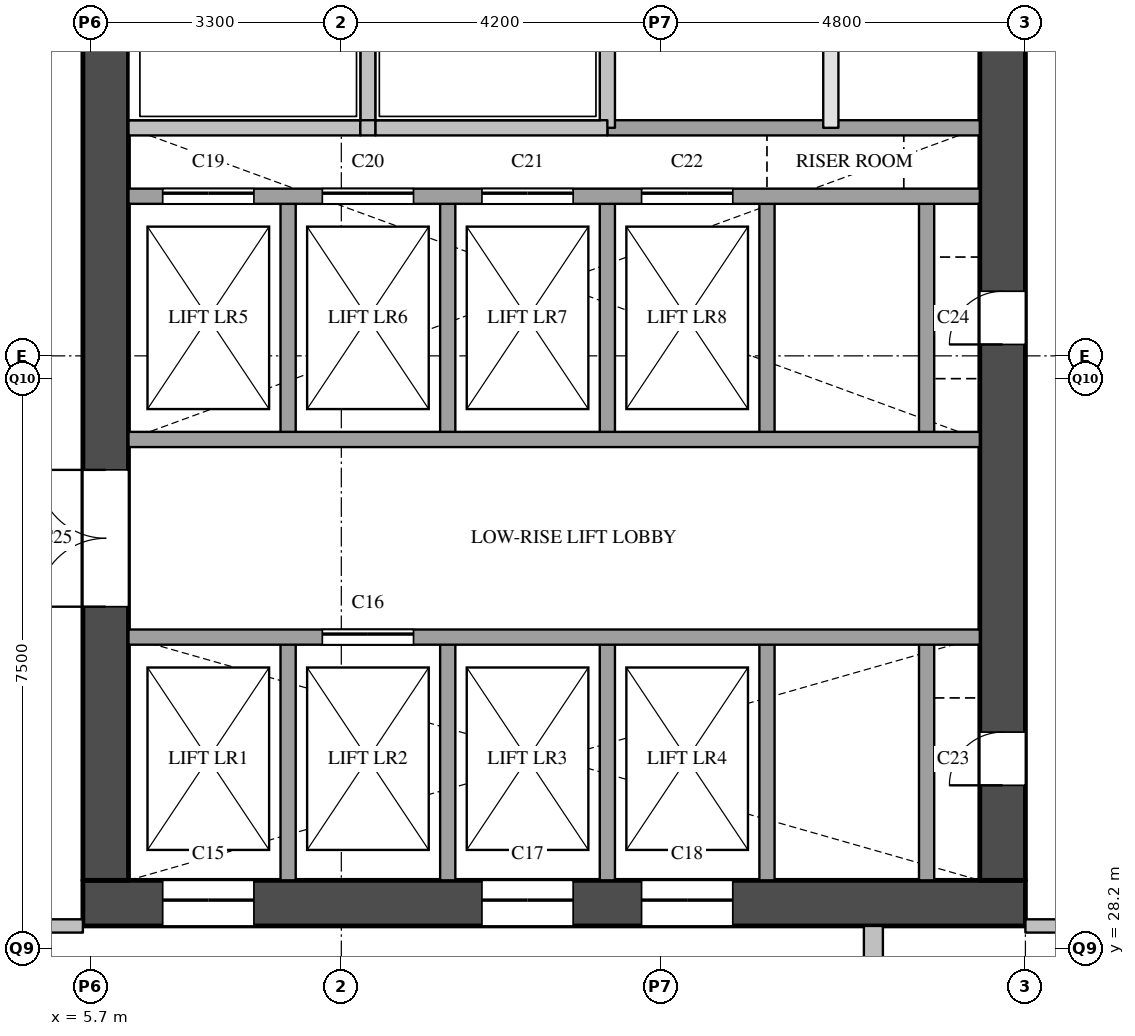
"""IFC4 building model, lengths in metres.
Left out: names, types, materials, properties, quantities, classifications, styles, units other than length and angle.
Written with IfcOpenShell. Run it as: python <this file> out.ifc"""

import sys

from ifc_helpers import new_model, si_unit, direction, frame, frame_2d, origin, place, context, subcontext, project, spatial, rectangle, extrude, element, fill, save


model = new_model("IFC4")
c1 = context("Model", 3, precision=1e-05, world=origin(), true_north=direction((0.0, 1.0)))
c2 = subcontext(c1, "Body", "Model", "MODEL_VIEW")
j1 = project(units=[si_unit("LENGTHUNIT", "METRE"), si_unit("PLANEANGLEUNIT", "RADIAN")], contexts=[c1])
p1 = place(None, origin())
s1 = spatial("IfcSite", under=j1, at=p1, CompositionType="ELEMENT")
p2 = place(p1, origin())
s2 = spatial("IfcBuilding", under=s1, at=p2, CompositionType="ELEMENT")
p3 = place(p2, frame((0.0, 0.0, 81.6)))
s3 = spatial("IfcBuildingStorey", under=s2, at=p3, CompositionType="ELEMENT", Elevation=81.6)
p4 = place(p3, frame((5.6, 28.8, 0.0), z_axis=(0.0, 0.0, 1.0), x_axis=(1.0, 0.0, 0.0)))
e1 = element("IfcWall", 1, at=p4, inside=s3, PredefinedType="SHEAR", context=c2, shape_type="SweptSolid", body=[
    extrude(rectangle(XDim=12.4, YDim=0.6, at=frame_2d((6.2, 0.0))), origin(), (0.0, 0.0, 1.0), 3.5),
])
p5 = place(p4, frame((1.05, 0.0, 0.0)))
e2 = element("IfcOpeningElement", 2, at=p5, cuts=e1, PredefinedType="OPENING", context=c2, shape_type="SweptSolid", body=[
    extrude(rectangle(XDim=1.2, YDim=2.1, at=frame_2d((0.6, 1.05))), frame((0.0, 0.31, 0.0), z_axis=(0.0, -1.0, 0.0), x_axis=(1.0, 0.0, 0.0)), (0.0, 0.0, 1.0), 0.62),
])
p6 = place(p4, frame((5.25, 0.0, 0.0)))
e3 = element("IfcOpeningElement", 3, at=p6, cuts=e1, PredefinedType="OPENING", context=c2, shape_type="SweptSolid", body=[
    extrude(rectangle(XDim=1.2, YDim=2.1, at=frame_2d((0.6, 1.05))), frame((0.0, 0.31, 0.0), z_axis=(0.0, -1.0, 0.0), x_axis=(1.0, 0.0, 0.0)), (0.0, 0.0, 1.0), 0.62),
])
p7 = place(p4, frame((7.35, 0.0, 0.0)))
e4 = element("IfcOpeningElement", 4, at=p7, cuts=e1, PredefinedType="OPENING", context=c2, shape_type="SweptSolid", body=[
    extrude(rectangle(XDim=1.2, YDim=2.1, at=frame_2d((0.6, 1.05))), frame((0.0, 0.31, 0.0), z_axis=(0.0, -1.0, 0.0), x_axis=(1.0, 0.0, 0.0)), (0.0, 0.0, 1.0), 0.62),
])
p8 = place(p3, frame((5.9, 29.1, 0.0), z_axis=(0.0, 0.0, 1.0), x_axis=(0.0, 1.0, 0.0)))
e5 = element("IfcWall", 5, at=p8, inside=s3, PredefinedType="SHEAR", context=c2, shape_type="SweptSolid", body=[
    extrude(rectangle(XDim=20.3, YDim=0.6, at=frame_2d((10.15, 0.0))), origin(), (0.0, 0.0, 1.0), 3.5),
])
p9 = place(p8, frame((3.6, 0.0, 0.0)))
e6 = element("IfcOpeningElement", 6, at=p9, cuts=e5, PredefinedType="OPENING", context=c2, shape_type="SweptSolid", body=[
    extrude(rectangle(XDim=1.8, YDim=2.1, at=frame_2d((0.9, 1.05))), frame((0.0, 0.31, 0.0), z_axis=(0.0, -1.0, 0.0), x_axis=(1.0, 0.0, 0.0)), (0.0, 0.0, 1.0), 0.62),
])
p10 = place(p8, frame((16.4, 0.0, 0.0)))
e7 = element("IfcOpeningElement", 7, at=p10, cuts=e5, PredefinedType="OPENING", context=c2, shape_type="SweptSolid", body=[
    extrude(rectangle(XDim=1.0, YDim=2.1, at=frame_2d((0.5, 1.05))), frame((0.0, 0.31, 0.0), z_axis=(0.0, -1.0, 0.0), x_axis=(1.0, 0.0, 0.0)), (0.0, 0.0, 1.0), 0.62),
])
p11 = place(p3, frame((17.7, 29.1, 0.0), z_axis=(0.0, 0.0, 1.0), x_axis=(0.0, 1.0, 0.0)))
e8 = element("IfcWall", 8, at=p11, inside=s3, PredefinedType="SHEAR", context=c2, shape_type="SweptSolid", body=[
    extrude(rectangle(XDim=20.3, YDim=0.6, at=frame_2d((10.15, 0.0))), origin(), (0.0, 0.0, 1.0), 3.5),
])
p12 = place(p11, frame((1.25, 0.0, 0.0)))
e9 = element("IfcOpeningElement", 9, at=p12, cuts=e8, PredefinedType="OPENING", context=c2, shape_type="SweptSolid", body=[
    extrude(rectangle(XDim=0.7, YDim=2.1, at=frame_2d((0.35, 1.05))), frame((0.0, 0.31, 0.0), z_axis=(0.0, -1.0, 0.0), x_axis=(1.0, 0.0, 0.0)), (0.0, 0.0, 1.0), 0.62),
])
p13 = place(p11, frame((7.05, 0.0, 0.0)))
e10 = element("IfcOpeningElement", 10, at=p13, cuts=e8, PredefinedType="OPENING", context=c2, shape_type="SweptSolid", body=[
    extrude(rectangle(XDim=0.7, YDim=2.1, at=frame_2d((0.35, 1.05))), frame((0.0, 0.31, 0.0), z_axis=(0.0, -1.0, 0.0), x_axis=(1.0, 0.0, 0.0)), (0.0, 0.0, 1.0), 0.62),
])
p14 = place(p3, frame((8.3, 29.1, 0.0), z_axis=(0.0, 0.0, 1.0), x_axis=(0.0, 1.0, 0.0)))
e11 = element("IfcWall", 11, at=p14, inside=s3, PredefinedType="SOLIDWALL", context=c2, shape_type="SweptSolid", body=[
    extrude(rectangle(XDim=3.2, YDim=0.2, at=frame_2d((1.6, 0.0))), origin(), (0.0, 0.0, 1.0), 3.5),
])
p15 = place(p3, frame((8.3, 34.9, 0.0), z_axis=(0.0, 0.0, 1.0), x_axis=(0.0, 1.0, 0.0)))
e12 = element("IfcWall", 12, at=p15, inside=s3, PredefinedType="SOLIDWALL", context=c2, shape_type="SweptSolid", body=[
    extrude(rectangle(XDim=3.2, YDim=0.2, at=frame_2d((1.6, 0.0))), origin(), (0.0, 0.0, 1.0), 3.5),
])
p16 = place(p3, frame((9.35, 39.0, 0.0), z_axis=(0.0, 0.0, 1.0), x_axis=(0.0, 1.0, 0.0)))
e13 = element("IfcWall", 13, at=p16, inside=s3, PredefinedType="SOLIDWALL", context=c2, shape_type="SweptSolid", body=[
    extrude(rectangle(XDim=1.9, YDim=0.2, at=frame_2d((0.95, 0.0))), origin(), (0.0, 0.0, 1.0), 3.5),
])
p17 = place(p3, frame((10.4, 29.1, 0.0), z_axis=(0.0, 0.0, 1.0), x_axis=(0.0, 1.0, 0.0)))
e14 = element("IfcWall", 14, at=p17, inside=s3, PredefinedType="SOLIDWALL", context=c2, shape_type="SweptSolid", body=[
    extrude(rectangle(XDim=3.2, YDim=0.2, at=frame_2d((1.6, 0.0))), origin(), (0.0, 0.0, 1.0), 3.5),
])
p18 = place(p3, frame((10.4, 34.9, 0.0), z_axis=(0.0, 0.0, 1.0), x_axis=(0.0, 1.0, 0.0)))
e15 = element("IfcWall", 15, at=p18, inside=s3, PredefinedType="SOLIDWALL", context=c2, shape_type="SweptSolid", body=[
    extrude(rectangle(XDim=3.2, YDim=0.2, at=frame_2d((1.6, 0.0))), origin(), (0.0, 0.0, 1.0), 3.5),
])
p19 = place(p3, frame((12.5, 29.1, 0.0), z_axis=(0.0, 0.0, 1.0), x_axis=(0.0, 1.0, 0.0)))
e16 = element("IfcWall", 16, at=p19, inside=s3, PredefinedType="SOLIDWALL", context=c2, shape_type="SweptSolid", body=[
    extrude(rectangle(XDim=3.2, YDim=0.2, at=frame_2d((1.6, 0.0))), origin(), (0.0, 0.0, 1.0), 3.5),
])
p20 = place(p3, frame((12.5, 34.9, 0.0), z_axis=(0.0, 0.0, 1.0), x_axis=(0.0, 1.0, 0.0)))
e17 = element("IfcWall", 17, at=p20, inside=s3, PredefinedType="SOLIDWALL", context=c2, shape_type="SweptSolid", body=[
    extrude(rectangle(XDim=3.2, YDim=0.2, at=frame_2d((1.6, 0.0))), origin(), (0.0, 0.0, 1.0), 3.5),
])
p21 = place(p3, frame((12.5, 39.0, 0.0), z_axis=(0.0, 0.0, 1.0), x_axis=(0.0, 1.0, 0.0)))
e18 = element("IfcWall", 18, at=p21, inside=s3, PredefinedType="SOLIDWALL", context=c2, shape_type="SweptSolid", body=[
    extrude(rectangle(XDim=1.9, YDim=0.2, at=frame_2d((0.95, 0.0))), origin(), (0.0, 0.0, 1.0), 3.5),
])
p22 = place(p3, frame((14.6, 29.1, 0.0), z_axis=(0.0, 0.0, 1.0), x_axis=(0.0, 1.0, 0.0)))
e19 = element("IfcWall", 19, at=p22, inside=s3, PredefinedType="SOLIDWALL", context=c2, shape_type="SweptSolid", body=[
    extrude(rectangle(XDim=3.2, YDim=0.2, at=frame_2d((1.6, 0.0))), origin(), (0.0, 0.0, 1.0), 3.5),
])
p23 = place(p3, frame((14.6, 34.9, 0.0), z_axis=(0.0, 0.0, 1.0), x_axis=(0.0, 1.0, 0.0)))
e20 = element("IfcWall", 20, at=p23, inside=s3, PredefinedType="SOLIDWALL", context=c2, shape_type="SweptSolid", body=[
    extrude(rectangle(XDim=3.2, YDim=0.2, at=frame_2d((1.6, 0.0))), origin(), (0.0, 0.0, 1.0), 3.5),
])
p24 = place(p3, frame((15.44, 39.0, 0.0), z_axis=(0.0, 0.0, 1.0), x_axis=(0.0, 1.0, 0.0)))
e21 = element("IfcWall", 21, at=p24, inside=s3, PredefinedType="PARTITIONING", context=c2, shape_type="SweptSolid", body=[
    extrude(rectangle(XDim=6.2, YDim=0.2, at=frame_2d((3.1, 0.0))), origin(), (0.0, 0.0, 1.0), 3.5),
])
p25 = place(p3, frame((16.7, 29.1, 0.0), z_axis=(0.0, 0.0, 1.0), x_axis=(0.0, 1.0, 0.0)))
e22 = element("IfcWall", 22, at=p25, inside=s3, PredefinedType="SOLIDWALL", context=c2, shape_type="SweptSolid", body=[
    extrude(rectangle(XDim=3.2, YDim=0.2, at=frame_2d((1.6, 0.0))), origin(), (0.0, 0.0, 1.0), 3.5),
])
p26 = place(p3, frame((16.7, 34.9, 0.0), z_axis=(0.0, 0.0, 1.0), x_axis=(0.0, 1.0, 0.0)))
e23 = element("IfcWall", 23, at=p26, inside=s3, PredefinedType="SOLIDWALL", context=c2, shape_type="SweptSolid", body=[
    extrude(rectangle(XDim=3.2, YDim=0.2, at=frame_2d((1.6, 0.0))), origin(), (0.0, 0.0, 1.0), 3.5),
])
p27 = place(p3, frame((6.2, 32.3, 0.0), z_axis=(0.0, 0.0, 1.0), x_axis=(1.0, 0.0, 0.0)))
e24 = element("IfcWall", 24, at=p27, inside=s3, PredefinedType="SOLIDWALL", context=c2, shape_type="SweptSolid", body=[
    extrude(rectangle(XDim=11.2, YDim=0.2, at=frame_2d((5.6, 0.0))), origin(), (0.0, 0.0, 1.0), 3.5),
])
p28 = place(p27, frame((2.55, 0.0, 0.0)))
e25 = element("IfcOpeningElement", 25, at=p28, cuts=e24, PredefinedType="OPENING", context=c2, shape_type="SweptSolid", body=[
    extrude(rectangle(XDim=1.2, YDim=2.1, at=frame_2d((0.6, 1.05))), frame((0.0, 0.11, 0.0), z_axis=(0.0, -1.0, 0.0), x_axis=(1.0, 0.0, 0.0)), (0.0, 0.0, 1.0), 0.22),
])
p29 = place(p3, frame((6.2, 34.9, 0.0), z_axis=(0.0, 0.0, 1.0), x_axis=(1.0, 0.0, 0.0)))
e26 = element("IfcWall", 26, at=p29, inside=s3, PredefinedType="SOLIDWALL", context=c2, shape_type="SweptSolid", body=[
    extrude(rectangle(XDim=11.2, YDim=0.2, at=frame_2d((5.6, 0.0))), origin(), (0.0, 0.0, 1.0), 3.5),
])
p30 = place(p3, frame((6.2, 38.1, 0.0), z_axis=(0.0, 0.0, 1.0), x_axis=(1.0, 0.0, 0.0)))
e27 = element("IfcWall", 27, at=p30, inside=s3, PredefinedType="SOLIDWALL", context=c2, shape_type="SweptSolid", body=[
    extrude(rectangle(XDim=11.2, YDim=0.2, at=frame_2d((5.6, 0.0))), origin(), (0.0, 0.0, 1.0), 3.5),
])
p31 = place(p30, frame((0.45, 0.0, 0.0)))
e28 = element("IfcOpeningElement", 28, at=p31, cuts=e27, PredefinedType="OPENING", context=c2, shape_type="SweptSolid", body=[
    extrude(rectangle(XDim=1.2, YDim=2.1, at=frame_2d((0.6, 1.05))), frame((0.0, 0.11, 0.0), z_axis=(0.0, -1.0, 0.0), x_axis=(1.0, 0.0, 0.0)), (0.0, 0.0, 1.0), 0.22),
])
p32 = place(p30, frame((2.55, 0.0, 0.0)))
e29 = element("IfcOpeningElement", 29, at=p32, cuts=e27, PredefinedType="OPENING", context=c2, shape_type="SweptSolid", body=[
    extrude(rectangle(XDim=1.2, YDim=2.1, at=frame_2d((0.6, 1.05))), frame((0.0, 0.11, 0.0), z_axis=(0.0, -1.0, 0.0), x_axis=(1.0, 0.0, 0.0)), (0.0, 0.0, 1.0), 0.22),
])
p33 = place(p30, frame((4.65, 0.0, 0.0)))
e30 = element("IfcOpeningElement", 30, at=p33, cuts=e27, PredefinedType="OPENING", context=c2, shape_type="SweptSolid", body=[
    extrude(rectangle(XDim=1.2, YDim=2.1, at=frame_2d((0.6, 1.05))), frame((0.0, 0.11, 0.0), z_axis=(0.0, -1.0, 0.0), x_axis=(1.0, 0.0, 0.0)), (0.0, 0.0, 1.0), 0.22),
])
p34 = place(p30, frame((6.75, 0.0, 0.0)))
e31 = element("IfcOpeningElement", 31, at=p34, cuts=e27, PredefinedType="OPENING", context=c2, shape_type="SweptSolid", body=[
    extrude(rectangle(XDim=1.2, YDim=2.1, at=frame_2d((0.6, 1.05))), frame((0.0, 0.11, 0.0), z_axis=(0.0, -1.0, 0.0), x_axis=(1.0, 0.0, 0.0)), (0.0, 0.0, 1.0), 0.22),
])
p35 = place(p3, frame((12.5, 39.0, 0.0), z_axis=(0.0, 0.0, 1.0), x_axis=(1.0, 0.0, 0.0)))
e32 = element("IfcWall", 32, at=p35, inside=s3, PredefinedType="SOLIDWALL", context=c2, shape_type="SweptSolid", body=[
    extrude(rectangle(XDim=4.9, YDim=0.2, at=frame_2d((2.45, 0.0))), origin(), (0.0, 0.0, 1.0), 3.5),
])
p36 = place(p3, frame((6.2, 39.0, 0.0), z_axis=(0.0, 0.0, 1.0), x_axis=(1.0, 0.0, 0.0)))
e33 = element("IfcWall", 33, at=p36, inside=s3, PredefinedType="SOLIDWALL", context=c2, shape_type="SweptSolid", body=[
    extrude(rectangle(XDim=3.05, YDim=0.2, at=frame_2d((1.525, 0.0))), origin(), (0.0, 0.0, 1.0), 3.5),
])
p37 = place(p3, frame((9.25, 39.0, 0.0), z_axis=(0.0, 0.0, 1.0), x_axis=(1.0, 0.0, 0.0)))
e34 = element("IfcWall", 34, at=p37, inside=s3, PredefinedType="SOLIDWALL", context=c2, shape_type="SweptSolid", body=[
    extrude(rectangle(XDim=0.2, YDim=0.2, at=frame_2d((0.1, 0.0))), origin(), (0.0, 0.0, 1.0), 3.5),
])
p38 = place(p3, frame((9.45, 39.0, 0.0), z_axis=(0.0, 0.0, 1.0), x_axis=(1.0, 0.0, 0.0)))
e35 = element("IfcWall", 35, at=p38, inside=s3, PredefinedType="SOLIDWALL", context=c2, shape_type="SweptSolid", body=[
    extrude(rectangle(XDim=3.05, YDim=0.2, at=frame_2d((1.525, 0.0))), origin(), (0.0, 0.0, 1.0), 3.5),
])
for number, where, z_axis, x_axis in (
    (36, (3.8, 28.5, 0.0), (0.0, 0.0, 1.0), (1.0, 0.0, 0.0)),
    (37, (18.0, 28.5, 0.0), (0.0, 0.0, 1.0), (1.0, 0.0, 0.0)),
):
    element("IfcWall", number, at=place(p3, frame(where, z_axis=z_axis, x_axis=x_axis)), inside=s3, PredefinedType="PARTITIONING", context=c2, shape_type="SweptSolid", body=[
        extrude(rectangle(XDim=1.8, YDim=0.175, at=frame_2d((0.9, 0.0))), origin(), (0.0, 0.0, 1.0), 3.5),
    ])
p39 = place(p3, frame((16.0, 27.0, 0.0), z_axis=(0.0, 0.0, 1.0), x_axis=(0.0, 1.0, 0.0)))
e38 = element("IfcWall", 38, at=p39, inside=s3, PredefinedType="PARTITIONING", context=c2, shape_type="SweptSolid", body=[
    extrude(rectangle(XDim=1.5, YDim=0.25, at=frame_2d((0.75, 0.0))), origin(), (0.0, 0.0, 1.0), 2.5),
])
p40 = place(p5, origin())
e39 = element("IfcDoor", 39, at=p40, inside=s3, OperationType="SLIDING_TO_LEFT", PredefinedType="DOOR", context=c2, shape_type="SweptSolid", body=[
    extrude(rectangle(XDim=1.2, YDim=2.1, at=frame_2d((0.6, 1.05))), frame((0.0, 0.025, 0.0), z_axis=(0.0, -1.0, 0.0), x_axis=(1.0, 0.0, 0.0)), (0.0, 0.0, 1.0), 0.05),
])
fill(e2, e39)
p41 = place(p28, origin())
e40 = element("IfcDoor", 40, at=p41, inside=s3, OperationType="SLIDING_TO_LEFT", PredefinedType="DOOR", context=c2, shape_type="SweptSolid", body=[
    extrude(rectangle(XDim=1.2, YDim=2.1, at=frame_2d((0.6, 1.05))), frame((0.0, 0.025, 0.0), z_axis=(0.0, -1.0, 0.0), x_axis=(1.0, 0.0, 0.0)), (0.0, 0.0, 1.0), 0.05),
])
fill(e25, e40)
p42 = place(p6, origin())
e41 = element("IfcDoor", 41, at=p42, inside=s3, OperationType="SLIDING_TO_LEFT", PredefinedType="DOOR", context=c2, shape_type="SweptSolid", body=[
    extrude(rectangle(XDim=1.2, YDim=2.1, at=frame_2d((0.6, 1.05))), frame((0.0, 0.025, 0.0), z_axis=(0.0, -1.0, 0.0), x_axis=(1.0, 0.0, 0.0)), (0.0, 0.0, 1.0), 0.05),
])
fill(e3, e41)
p43 = place(p7, origin())
e42 = element("IfcDoor", 42, at=p43, inside=s3, OperationType="SLIDING_TO_LEFT", PredefinedType="DOOR", context=c2, shape_type="SweptSolid", body=[
    extrude(rectangle(XDim=1.2, YDim=2.1, at=frame_2d((0.6, 1.05))), frame((0.0, 0.025, 0.0), z_axis=(0.0, -1.0, 0.0), x_axis=(1.0, 0.0, 0.0)), (0.0, 0.0, 1.0), 0.05),
])
fill(e4, e42)
p44 = place(p31, origin())
e43 = element("IfcDoor", 43, at=p44, inside=s3, OperationType="SLIDING_TO_LEFT", PredefinedType="DOOR", context=c2, shape_type="SweptSolid", body=[
    extrude(rectangle(XDim=1.2, YDim=2.1, at=frame_2d((0.6, 1.05))), frame((0.0, 0.025, 0.0), z_axis=(0.0, -1.0, 0.0), x_axis=(1.0, 0.0, 0.0)), (0.0, 0.0, 1.0), 0.05),
])
fill(e28, e43)
p45 = place(p32, origin())
e44 = element("IfcDoor", 44, at=p45, inside=s3, OperationType="SLIDING_TO_LEFT", PredefinedType="DOOR", context=c2, shape_type="SweptSolid", body=[
    extrude(rectangle(XDim=1.2, YDim=2.1, at=frame_2d((0.6, 1.05))), frame((0.0, 0.025, 0.0), z_axis=(0.0, -1.0, 0.0), x_axis=(1.0, 0.0, 0.0)), (0.0, 0.0, 1.0), 0.05),
])
fill(e29, e44)
p46 = place(p33, origin())
e45 = element("IfcDoor", 45, at=p46, inside=s3, OperationType="SLIDING_TO_LEFT", PredefinedType="DOOR", context=c2, shape_type="SweptSolid", body=[
    extrude(rectangle(XDim=1.2, YDim=2.1, at=frame_2d((0.6, 1.05))), frame((0.0, 0.025, 0.0), z_axis=(0.0, -1.0, 0.0), x_axis=(1.0, 0.0, 0.0)), (0.0, 0.0, 1.0), 0.05),
])
fill(e30, e45)
p47 = place(p34, origin())
e46 = element("IfcDoor", 46, at=p47, inside=s3, OperationType="SLIDING_TO_LEFT", PredefinedType="DOOR", context=c2, shape_type="SweptSolid", body=[
    extrude(rectangle(XDim=1.2, YDim=2.1, at=frame_2d((0.6, 1.05))), frame((0.0, 0.025, 0.0), z_axis=(0.0, -1.0, 0.0), x_axis=(1.0, 0.0, 0.0)), (0.0, 0.0, 1.0), 0.05),
])
fill(e31, e46)
p48 = place(p12, origin())
e47 = element("IfcDoor", 47, at=p48, inside=s3, OperationType="SINGLE_SWING_LEFT", PredefinedType="DOOR", context=c2, shape_type="SweptSolid", body=[
    extrude(rectangle(XDim=0.7, YDim=2.1, at=frame_2d((0.35, 1.05))), frame((0.0, 0.025, 0.0), z_axis=(0.0, -1.0, 0.0), x_axis=(1.0, 0.0, 0.0)), (0.0, 0.0, 1.0), 0.05),
])
fill(e9, e47)
p49 = place(p13, origin())
e48 = element("IfcDoor", 48, at=p49, inside=s3, OperationType="SINGLE_SWING_LEFT", PredefinedType="DOOR", context=c2, shape_type="SweptSolid", body=[
    extrude(rectangle(XDim=0.7, YDim=2.1, at=frame_2d((0.35, 1.05))), frame((0.0, 0.025, 0.0), z_axis=(0.0, -1.0, 0.0), x_axis=(1.0, 0.0, 0.0)), (0.0, 0.0, 1.0), 0.05),
])
fill(e10, e48)
p50 = place(p9, origin())
e49 = element("IfcDoor", 49, at=p50, inside=s3, OperationType="DOUBLE_DOOR_SINGLE_SWING", PredefinedType="DOOR", context=c2, shape_type="SweptSolid", body=[
    extrude(rectangle(XDim=1.8, YDim=2.1, at=frame_2d((0.9, 1.05))), frame((0.0, 0.025, 0.0), z_axis=(0.0, -1.0, 0.0), x_axis=(1.0, 0.0, 0.0)), (0.0, 0.0, 1.0), 0.05),
])
fill(e6, e49)
save(model, sys.argv[1])
